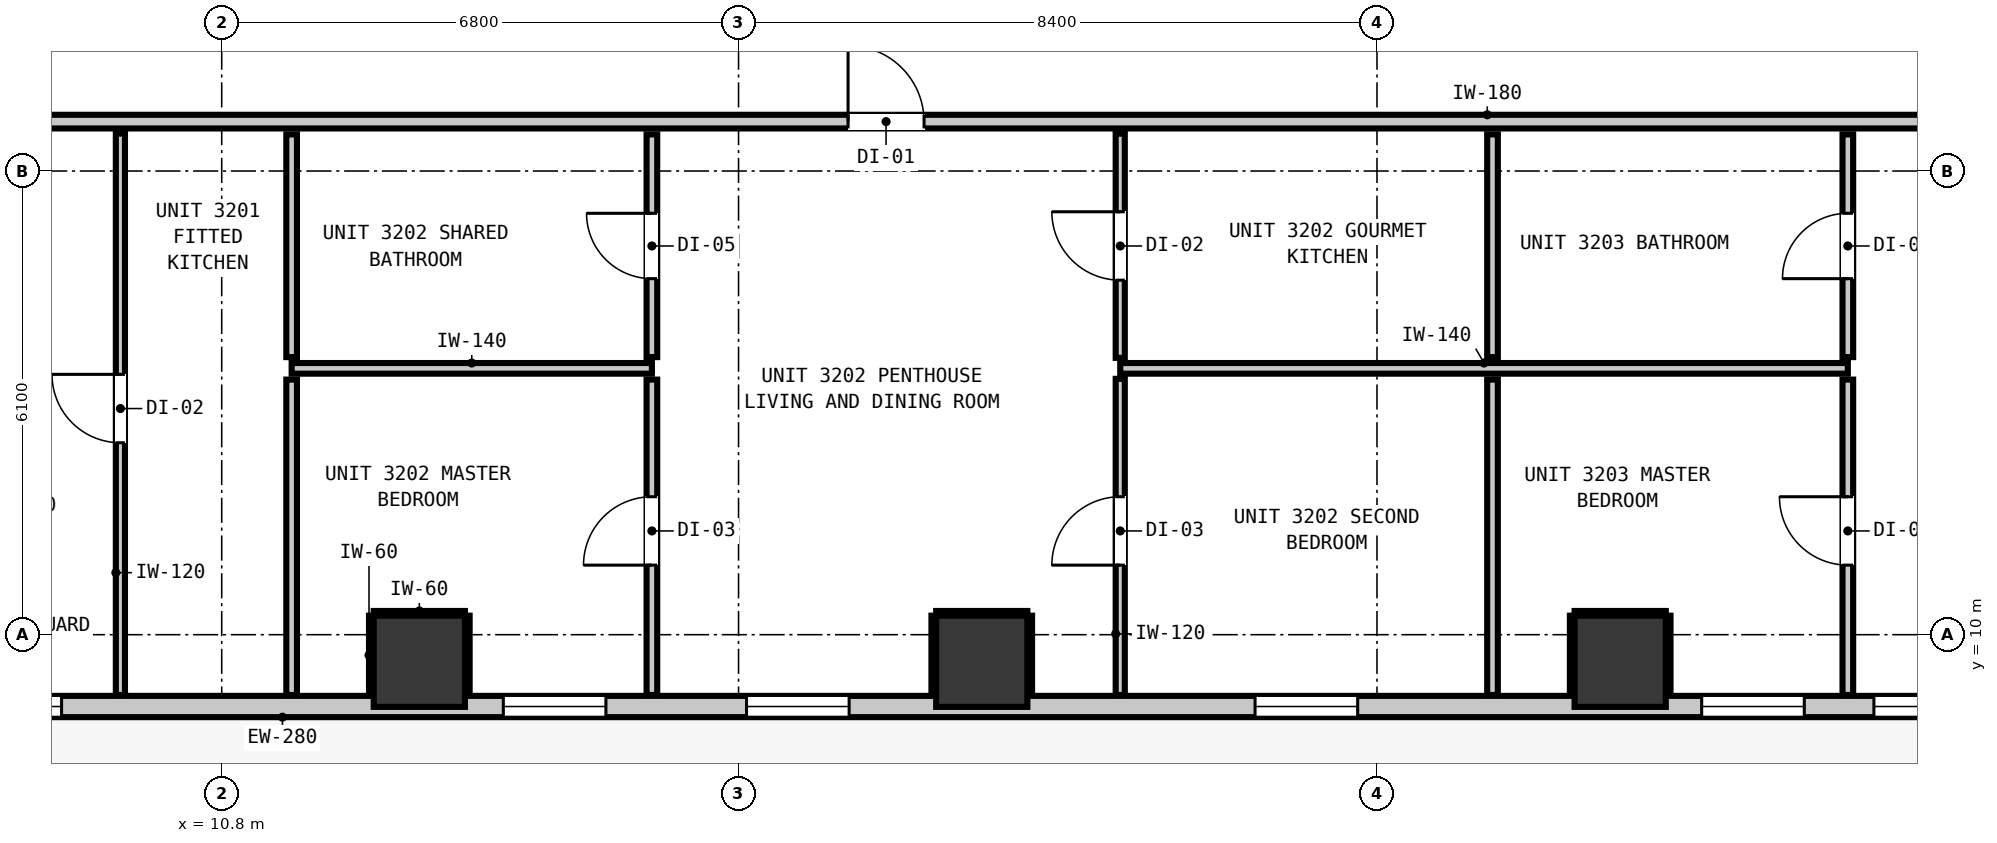
"""IFC4 building model, lengths in metres.
Left out: names, types, materials, properties, quantities, classifications, styles, units other than length and angle.
Written with IfcOpenShell. Run it as: python <this file> out.ifc"""

import sys

from ifc_helpers import new_model, si_unit, direction, frame, frame_2d, origin, origin_2d, place, context, subcontext, project, spatial, rectangle, extrude, element, fill, save


model = new_model("IFC4")
c1 = context("Model", 3, precision=1e-05, world=origin(), true_north=direction((0.0, 1.0)))
c2 = subcontext(c1, "Body", "Model", "MODEL_VIEW")
j1 = project(units=[si_unit("LENGTHUNIT", "METRE"), si_unit("PLANEANGLEUNIT", "RADIAN")], contexts=[c1])
p1 = place(None, origin())
s1 = spatial("IfcSite", under=j1, at=p1, CompositionType="ELEMENT")
p2 = place(p1, origin())
s2 = spatial("IfcBuilding", under=s1, at=p2, CompositionType="ELEMENT")
p3 = place(p2, frame((0.0, 0.0, 112.72)))
s3 = spatial("IfcBuildingStorey", under=s2, at=p3, CompositionType="ELEMENT", Elevation=112.72)
for number, where, z_axis, x_axis in (
    (1, (13.4, 9.65, 0.0), (0.0, 0.0, 1.0), (1.0, 0.0, 0.0)),
    (2, (20.8, 9.65, 0.0), (0.0, 0.0, 1.0), (1.0, 0.0, 0.0)),
    (3, (29.2, 9.65, 0.0), (0.0, 0.0, 1.0), (1.0, 0.0, 0.0)),
):
    element("IfcColumn", number, at=place(p3, frame(where, z_axis=z_axis, x_axis=x_axis)), inside=s3, PredefinedType="COLUMN", context=c2, shape_type="SweptSolid", body=[
        extrude(rectangle(XDim=1.2, YDim=1.2, at=origin_2d()), origin(), (0.0, 0.0, 1.0), 3.32),
    ])
p4 = place(p3, frame((40.445, 9.055, 0.0), z_axis=(0.0, 0.0, 1.0), x_axis=(-1.0, 0.0, 0.0)))
e4 = element("IfcWall", 4, at=p4, inside=s3, PredefinedType="STANDARD", context=c2, shape_type="SweptSolid", body=[
    extrude(rectangle(XDim=35.09, YDim=0.28, at=frame_2d((17.545, 0.0))), origin(), (0.0, 0.0, 1.0), 3.08),
])
p5 = place(p4, frame((5.114, 0.0, 0.0)))
e5 = element("IfcOpeningElement", 5, at=p5, cuts=e4, PredefinedType="OPENING", context=c2, shape_type="SweptSolid", body=[
    extrude(rectangle(XDim=1.0, YDim=2.15, at=frame_2d((0.5, 1.075))), frame((0.0, 0.15, 0.0), z_axis=(0.0, -1.0, 0.0), x_axis=(1.0, 0.0, 0.0)), (0.0, 0.0, 1.0), 0.3),
])
p6 = place(p4, frame((31.752, 0.0, 0.85)))
e6 = element("IfcOpeningElement", 6, at=p6, cuts=e4, PredefinedType="OPENING", context=c2, shape_type="SweptSolid", body=[
    extrude(rectangle(XDim=1.35, YDim=1.85, at=frame_2d((0.675, 0.925))), frame((0.0, 0.15, 0.0), z_axis=(0.0, -1.0, 0.0), x_axis=(1.0, 0.0, 0.0)), (0.0, 0.0, 1.0), 0.3),
])
p7 = place(p4, frame((34.198, 0.0, 0.85)))
e7 = element("IfcOpeningElement", 7, at=p7, cuts=e4, PredefinedType="OPENING", context=c2, shape_type="SweptSolid", body=[
    extrude(rectangle(XDim=0.58, YDim=1.5, at=frame_2d((0.29, 0.75))), frame((0.0, 0.15, 0.0), z_axis=(0.0, -1.0, 0.0), x_axis=(1.0, 0.0, 0.0)), (0.0, 0.0, 1.0), 0.3),
])
p8 = place(p4, frame((21.39, 0.0, 0.85)))
e8 = element("IfcOpeningElement", 8, at=p8, cuts=e4, PredefinedType="OPENING", context=c2, shape_type="SweptSolid", body=[
    extrude(rectangle(XDim=1.35, YDim=1.85, at=frame_2d((0.675, 0.925))), frame((0.0, 0.15, 0.0), z_axis=(0.0, -1.0, 0.0), x_axis=(1.0, 0.0, 0.0)), (0.0, 0.0, 1.0), 0.3),
])
p9 = place(p4, frame((24.59, 0.0, 0.85)))
e9 = element("IfcOpeningElement", 9, at=p9, cuts=e4, PredefinedType="OPENING", context=c2, shape_type="SweptSolid", body=[
    extrude(rectangle(XDim=1.35, YDim=1.85, at=frame_2d((0.675, 0.925))), frame((0.0, 0.15, 0.0), z_axis=(0.0, -1.0, 0.0), x_axis=(1.0, 0.0, 0.0)), (0.0, 0.0, 1.0), 0.3),
])
p10 = place(p4, frame((14.699, 0.0, 0.85)))
e10 = element("IfcOpeningElement", 10, at=p10, cuts=e4, PredefinedType="OPENING", context=c2, shape_type="SweptSolid", body=[
    extrude(rectangle(XDim=1.35, YDim=1.85, at=frame_2d((0.675, 0.925))), frame((0.0, 0.15, 0.0), z_axis=(0.0, -1.0, 0.0), x_axis=(1.0, 0.0, 0.0)), (0.0, 0.0, 1.0), 0.3),
])
p11 = place(p4, frame((6.557, 0.0, 0.85)))
e11 = element("IfcOpeningElement", 11, at=p11, cuts=e4, PredefinedType="OPENING", context=c2, shape_type="SweptSolid", body=[
    extrude(rectangle(XDim=1.35, YDim=1.85, at=frame_2d((0.675, 0.925))), frame((0.0, 0.15, 0.0), z_axis=(0.0, -1.0, 0.0), x_axis=(1.0, 0.0, 0.0)), (0.0, 0.0, 1.0), 0.3),
])
p12 = place(p4, frame((8.823, 0.0, 0.85)))
e12 = element("IfcOpeningElement", 12, at=p12, cuts=e4, PredefinedType="OPENING", context=c2, shape_type="SweptSolid", body=[
    extrude(rectangle(XDim=1.35, YDim=1.85, at=frame_2d((0.675, 0.925))), frame((0.0, 0.15, 0.0), z_axis=(0.0, -1.0, 0.0), x_axis=(1.0, 0.0, 0.0)), (0.0, 0.0, 1.0), 0.3),
])
p13 = place(p3, frame((3.207, 16.75, 0.0), z_axis=(0.0, 0.0, 1.0), x_axis=(1.0, 0.0, 0.0)))
e13 = element("IfcWall", 13, at=p13, inside=s3, PredefinedType="PARTITIONING", context=c2, shape_type="SweptSolid", body=[
    extrude(rectangle(XDim=39.386, YDim=0.18, at=frame_2d((19.693, 0.0))), origin(), (0.0, 0.0, 1.0), 3.08),
])
p14 = place(p13, frame((4.311, 0.0, 0.0)))
e14 = element("IfcOpeningElement", 14, at=p14, cuts=e13, PredefinedType="OPENING", context=c2, shape_type="SweptSolid", body=[
    extrude(rectangle(XDim=1.0, YDim=2.15, at=frame_2d((0.5, 1.075))), frame((0.0, 0.1, 0.0), z_axis=(0.0, -1.0, 0.0), x_axis=(1.0, 0.0, 0.0)), (0.0, 0.0, 1.0), 0.2),
])
p15 = place(p13, frame((15.834, 0.0, 0.0)))
e15 = element("IfcOpeningElement", 15, at=p15, cuts=e13, PredefinedType="OPENING", context=c2, shape_type="SweptSolid", body=[
    extrude(rectangle(XDim=1.0, YDim=2.15, at=frame_2d((0.5, 1.075))), frame((0.0, 0.1, 0.0), z_axis=(0.0, -1.0, 0.0), x_axis=(1.0, 0.0, 0.0)), (0.0, 0.0, 1.0), 0.2),
])
p16 = place(p13, frame((31.654, 0.0, 0.0)))
e16 = element("IfcOpeningElement", 16, at=p16, cuts=e13, PredefinedType="OPENING", context=c2, shape_type="SweptSolid", body=[
    extrude(rectangle(XDim=1.0, YDim=2.15, at=frame_2d((0.5, 1.075))), frame((0.0, 0.1, 0.0), z_axis=(0.0, -1.0, 0.0), x_axis=(1.0, 0.0, 0.0)), (0.0, 0.0, 1.0), 0.2),
])
p17 = place(p3, frame((11.72, 13.504, 0.0), z_axis=(0.0, 0.0, 1.0), x_axis=(1.0, 0.0, 0.0)))
e17 = element("IfcWall", 17, at=p17, inside=s3, PredefinedType="PARTITIONING", context=c2, shape_type="SweptSolid", body=[
    extrude(rectangle(XDim=4.74, YDim=0.14, at=frame_2d((2.37, 0.0))), origin(), (0.0, 0.0, 1.0), 3.08),
])
p18 = place(p3, frame((22.622, 13.504, 0.0), z_axis=(0.0, 0.0, 1.0), x_axis=(1.0, 0.0, 0.0)))
e18 = element("IfcWall", 18, at=p18, inside=s3, PredefinedType="PARTITIONING", context=c2, shape_type="SweptSolid", body=[
    extrude(rectangle(XDim=9.573, YDim=0.14, at=frame_2d((4.787, 0.0))), origin(), (0.0, 0.0, 1.0), 3.08),
])
p19 = place(p3, frame((11.72, 9.207, 0.0), z_axis=(0.0, 0.0, 1.0), x_axis=(0.0, 1.0, 0.0)))
e19 = element("IfcWall", 19, at=p19, inside=s3, PredefinedType="PARTITIONING", context=c2, shape_type="SweptSolid", body=[
    extrude(rectangle(XDim=4.149, YDim=0.14, at=frame_2d((2.074, 0.0))), origin(), (0.0, 0.0, 1.0), 3.08),
])
p20 = place(p3, frame((11.72, 13.652, 0.0), z_axis=(0.0, 0.0, 1.0), x_axis=(0.0, 1.0, 0.0)))
e20 = element("IfcWall", 20, at=p20, inside=s3, PredefinedType="PARTITIONING", context=c2, shape_type="SweptSolid", body=[
    extrude(rectangle(XDim=2.93, YDim=0.14, at=frame_2d((1.465, 0.0))), origin(), (0.0, 0.0, 1.0), 3.08),
])
p21 = place(p3, frame((16.46, 9.207, 0.0), z_axis=(0.0, 0.0, 1.0), x_axis=(0.0, 1.0, 0.0)))
e21 = element("IfcWall", 21, at=p21, inside=s3, PredefinedType="PARTITIONING", context=c2, shape_type="SweptSolid", body=[
    extrude(rectangle(XDim=4.149, YDim=0.14, at=frame_2d((2.074, 0.0))), origin(), (0.0, 0.0, 1.0), 3.08),
])
p22 = place(p21, frame((1.708, 0.0, 0.0)))
e22 = element("IfcOpeningElement", 22, at=p22, cuts=e21, PredefinedType="OPENING", context=c2, shape_type="SweptSolid", body=[
    extrude(rectangle(XDim=0.9, YDim=2.1, at=frame_2d((0.45, 1.05))), frame((0.0, 0.08, 0.0), z_axis=(0.0, -1.0, 0.0), x_axis=(1.0, 0.0, 0.0)), (0.0, 0.0, 1.0), 0.16),
])
p23 = place(p3, frame((16.46, 13.652, 0.0), z_axis=(0.0, 0.0, 1.0), x_axis=(0.0, 1.0, 0.0)))
e23 = element("IfcWall", 23, at=p23, inside=s3, PredefinedType="PARTITIONING", context=c2, shape_type="SweptSolid", body=[
    extrude(rectangle(XDim=2.93, YDim=0.14, at=frame_2d((1.465, 0.0))), origin(), (0.0, 0.0, 1.0), 3.08),
])
p24 = place(p23, frame((1.032, 0.0, 0.0)))
e24 = element("IfcOpeningElement", 24, at=p24, cuts=e23, PredefinedType="OPENING", context=c2, shape_type="SweptSolid", body=[
    extrude(rectangle(XDim=0.86, YDim=2.02, at=frame_2d((0.43, 1.01))), frame((0.0, 0.08, 0.0), z_axis=(0.0, -1.0, 0.0), x_axis=(1.0, 0.0, 0.0)), (0.0, 0.0, 1.0), 0.16),
])
p25 = place(p3, frame((27.52, 9.207, 0.0), z_axis=(0.0, 0.0, 1.0), x_axis=(0.0, 1.0, 0.0)))
e25 = element("IfcWall", 25, at=p25, inside=s3, PredefinedType="PARTITIONING", context=c2, shape_type="SweptSolid", body=[
    extrude(rectangle(XDim=4.149, YDim=0.14, at=frame_2d((2.074, 0.0))), origin(), (0.0, 0.0, 1.0), 3.08),
])
p26 = place(p3, frame((27.52, 13.652, 0.0), z_axis=(0.0, 0.0, 1.0), x_axis=(0.0, 1.0, 0.0)))
e26 = element("IfcWall", 26, at=p26, inside=s3, PredefinedType="PARTITIONING", context=c2, shape_type="SweptSolid", body=[
    extrude(rectangle(XDim=2.93, YDim=0.14, at=frame_2d((1.465, 0.0))), origin(), (0.0, 0.0, 1.0), 3.08),
])
p27 = place(p3, frame((32.195, 9.207, 0.0), z_axis=(0.0, 0.0, 1.0), x_axis=(0.0, 1.0, 0.0)))
e27 = element("IfcWall", 27, at=p27, inside=s3, PredefinedType="PARTITIONING", context=c2, shape_type="SweptSolid", body=[
    extrude(rectangle(XDim=4.149, YDim=0.14, at=frame_2d((2.074, 0.0))), origin(), (0.0, 0.0, 1.0), 3.08),
])
p28 = place(p27, frame((1.708, 0.0, 0.0)))
e28 = element("IfcOpeningElement", 28, at=p28, cuts=e27, PredefinedType="OPENING", context=c2, shape_type="SweptSolid", body=[
    extrude(rectangle(XDim=0.9, YDim=2.1, at=frame_2d((0.45, 1.05))), frame((0.0, 0.08, 0.0), z_axis=(0.0, -1.0, 0.0), x_axis=(1.0, 0.0, 0.0)), (0.0, 0.0, 1.0), 0.16),
])
p29 = place(p3, frame((32.195, 13.652, 0.0), z_axis=(0.0, 0.0, 1.0), x_axis=(0.0, 1.0, 0.0)))
e29 = element("IfcWall", 29, at=p29, inside=s3, PredefinedType="PARTITIONING", context=c2, shape_type="SweptSolid", body=[
    extrude(rectangle(XDim=2.93, YDim=0.14, at=frame_2d((1.465, 0.0))), origin(), (0.0, 0.0, 1.0), 3.08),
])
p30 = place(p29, frame((1.032, 0.0, 0.0)))
e30 = element("IfcOpeningElement", 30, at=p30, cuts=e29, PredefinedType="OPENING", context=c2, shape_type="SweptSolid", body=[
    extrude(rectangle(XDim=0.86, YDim=2.02, at=frame_2d((0.43, 1.01))), frame((0.0, 0.08, 0.0), z_axis=(0.0, -1.0, 0.0), x_axis=(1.0, 0.0, 0.0)), (0.0, 0.0, 1.0), 0.16),
])
p31 = place(p3, frame((9.467, 9.207, 0.0), z_axis=(0.0, 0.0, 1.0), x_axis=(0.0, 1.0, 0.0)))
e31 = element("IfcWall", 31, at=p31, inside=s3, PredefinedType="PARTITIONING", context=c2, shape_type="SweptSolid", body=[
    extrude(rectangle(XDim=7.385, YDim=0.12, at=frame_2d((3.692, 0.0))), origin(), (0.0, 0.0, 1.0), 3.08),
])
p32 = place(p31, frame((3.318, 0.0, 0.0)))
e32 = element("IfcOpeningElement", 32, at=p32, cuts=e31, PredefinedType="OPENING", context=c2, shape_type="SweptSolid", body=[
    extrude(rectangle(XDim=0.9, YDim=2.1, at=frame_2d((0.45, 1.05))), frame((0.0, 0.07, 0.0), z_axis=(0.0, -1.0, 0.0), x_axis=(1.0, 0.0, 0.0)), (0.0, 0.0, 1.0), 0.14),
])
p33 = place(p3, frame((22.622, 9.207, 0.0), z_axis=(0.0, 0.0, 1.0), x_axis=(0.0, 1.0, 0.0)))
e33 = element("IfcWall", 33, at=p33, inside=s3, PredefinedType="PARTITIONING", context=c2, shape_type="SweptSolid", body=[
    extrude(rectangle(XDim=4.159, YDim=0.12, at=frame_2d((2.08, 0.0))), origin(), (0.0, 0.0, 1.0), 3.08),
])
p34 = place(p33, frame((1.708, 0.0, 0.0)))
e34 = element("IfcOpeningElement", 34, at=p34, cuts=e33, PredefinedType="OPENING", context=c2, shape_type="SweptSolid", body=[
    extrude(rectangle(XDim=0.9, YDim=2.1, at=frame_2d((0.45, 1.05))), frame((0.0, 0.07, 0.0), z_axis=(0.0, -1.0, 0.0), x_axis=(1.0, 0.0, 0.0)), (0.0, 0.0, 1.0), 0.14),
])
p35 = place(p3, frame((22.622, 13.642, 0.0), z_axis=(0.0, 0.0, 1.0), x_axis=(0.0, 1.0, 0.0)))
e35 = element("IfcWall", 35, at=p35, inside=s3, PredefinedType="PARTITIONING", context=c2, shape_type="SweptSolid", body=[
    extrude(rectangle(XDim=2.95, YDim=0.12, at=frame_2d((1.475, 0.0))), origin(), (0.0, 0.0, 1.0), 3.08),
])
p36 = place(p35, frame((1.022, 0.0, 0.0)))
e36 = element("IfcOpeningElement", 36, at=p36, cuts=e35, PredefinedType="OPENING", context=c2, shape_type="SweptSolid", body=[
    extrude(rectangle(XDim=0.9, YDim=2.1, at=frame_2d((0.45, 1.05))), frame((0.0, 0.07, 0.0), z_axis=(0.0, -1.0, 0.0), x_axis=(1.0, 0.0, 0.0)), (0.0, 0.0, 1.0), 0.14),
])
p37 = place(p3, frame((12.8, 10.282, 0.0), z_axis=(0.0, 0.0, 1.0), x_axis=(1.0, 0.0, 0.0)))
e37 = element("IfcWall", 37, at=p37, inside=s3, PredefinedType="PARTITIONING", context=c2, shape_type="SweptSolid", body=[
    extrude(rectangle(XDim=1.2, YDim=0.06, at=frame_2d((0.6, 0.0))), origin(), (0.0, 0.0, 1.0), 1.45),
])
for number, where, z_axis, x_axis in (
    (38, (12.768, 9.21, 0.0), (0.0, 0.0, 1.0), (0.0, 1.0, 0.0)),
    (39, (14.032, 9.21, 0.0), (0.0, 0.0, 1.0), (0.0, 1.0, 0.0)),
):
    element("IfcWall", number, at=place(p3, frame(where, z_axis=z_axis, x_axis=x_axis)), inside=s3, PredefinedType="PARTITIONING", context=c2, shape_type="SweptSolid", body=[
        extrude(rectangle(XDim=1.04, YDim=0.06, at=frame_2d((0.52, 0.0))), origin(), (0.0, 0.0, 1.0), 1.45),
    ])
p38 = place(p3, frame((20.2, 10.282, 0.0), z_axis=(0.0, 0.0, 1.0), x_axis=(1.0, 0.0, 0.0)))
e40 = element("IfcWall", 40, at=p38, inside=s3, PredefinedType="PARTITIONING", context=c2, shape_type="SweptSolid", body=[
    extrude(rectangle(XDim=1.2, YDim=0.06, at=frame_2d((0.6, 0.0))), origin(), (0.0, 0.0, 1.0), 1.45),
])
for number, where, z_axis, x_axis in (
    (41, (20.168, 9.21, 0.0), (0.0, 0.0, 1.0), (0.0, 1.0, 0.0)),
    (42, (21.432, 9.21, 0.0), (0.0, 0.0, 1.0), (0.0, 1.0, 0.0)),
):
    element("IfcWall", number, at=place(p3, frame(where, z_axis=z_axis, x_axis=x_axis)), inside=s3, PredefinedType="PARTITIONING", context=c2, shape_type="SweptSolid", body=[
        extrude(rectangle(XDim=1.04, YDim=0.06, at=frame_2d((0.52, 0.0))), origin(), (0.0, 0.0, 1.0), 1.45),
    ])
p39 = place(p3, frame((28.6, 10.282, 0.0), z_axis=(0.0, 0.0, 1.0), x_axis=(1.0, 0.0, 0.0)))
e43 = element("IfcWall", 43, at=p39, inside=s3, PredefinedType="PARTITIONING", context=c2, shape_type="SweptSolid", body=[
    extrude(rectangle(XDim=1.2, YDim=0.06, at=frame_2d((0.6, 0.0))), origin(), (0.0, 0.0, 1.0), 1.45),
])
for number, where, z_axis, x_axis in (
    (44, (28.568, 9.21, 0.0), (0.0, 0.0, 1.0), (0.0, 1.0, 0.0)),
    (45, (29.832, 9.21, 0.0), (0.0, 0.0, 1.0), (0.0, 1.0, 0.0)),
):
    element("IfcWall", number, at=place(p3, frame(where, z_axis=z_axis, x_axis=x_axis)), inside=s3, PredefinedType="PARTITIONING", context=c2, shape_type="SweptSolid", body=[
        extrude(rectangle(XDim=1.04, YDim=0.06, at=frame_2d((0.52, 0.0))), origin(), (0.0, 0.0, 1.0), 1.45),
    ])
p40 = place(p6, origin())
e46 = element("IfcWindow", 46, at=p40, inside=s3, PartitioningType="SINGLE_PANEL", PredefinedType="WINDOW", context=c2, shape_type="SweptSolid", body=[
    extrude(rectangle(XDim=1.35, YDim=1.85, at=frame_2d((0.675, 0.925))), frame((0.0, 0.03, 0.0), z_axis=(0.0, -1.0, 0.0), x_axis=(1.0, 0.0, 0.0)), (0.0, 0.0, 1.0), 0.06),
])
fill(e6, e46)
p41 = place(p8, origin())
e47 = element("IfcWindow", 47, at=p41, inside=s3, PartitioningType="SINGLE_PANEL", PredefinedType="WINDOW", context=c2, shape_type="SweptSolid", body=[
    extrude(rectangle(XDim=1.35, YDim=1.85, at=frame_2d((0.675, 0.925))), frame((0.0, 0.03, 0.0), z_axis=(0.0, -1.0, 0.0), x_axis=(1.0, 0.0, 0.0)), (0.0, 0.0, 1.0), 0.06),
])
fill(e8, e47)
p42 = place(p9, origin())
e48 = element("IfcWindow", 48, at=p42, inside=s3, PartitioningType="SINGLE_PANEL", PredefinedType="WINDOW", context=c2, shape_type="SweptSolid", body=[
    extrude(rectangle(XDim=1.35, YDim=1.85, at=frame_2d((0.675, 0.925))), frame((0.0, 0.03, 0.0), z_axis=(0.0, -1.0, 0.0), x_axis=(1.0, 0.0, 0.0)), (0.0, 0.0, 1.0), 0.06),
])
fill(e9, e48)
p43 = place(p10, origin())
e49 = element("IfcWindow", 49, at=p43, inside=s3, PartitioningType="SINGLE_PANEL", PredefinedType="WINDOW", context=c2, shape_type="SweptSolid", body=[
    extrude(rectangle(XDim=1.35, YDim=1.85, at=frame_2d((0.675, 0.925))), frame((0.0, 0.03, 0.0), z_axis=(0.0, -1.0, 0.0), x_axis=(1.0, 0.0, 0.0)), (0.0, 0.0, 1.0), 0.06),
])
fill(e10, e49)
p44 = place(p11, origin())
e50 = element("IfcWindow", 50, at=p44, inside=s3, PartitioningType="SINGLE_PANEL", PredefinedType="WINDOW", context=c2, shape_type="SweptSolid", body=[
    extrude(rectangle(XDim=1.35, YDim=1.85, at=frame_2d((0.675, 0.925))), frame((0.0, 0.03, 0.0), z_axis=(0.0, -1.0, 0.0), x_axis=(1.0, 0.0, 0.0)), (0.0, 0.0, 1.0), 0.06),
])
fill(e11, e50)
p45 = place(p12, origin())
e51 = element("IfcWindow", 51, at=p45, inside=s3, PartitioningType="SINGLE_PANEL", PredefinedType="WINDOW", context=c2, shape_type="SweptSolid", body=[
    extrude(rectangle(XDim=1.35, YDim=1.85, at=frame_2d((0.675, 0.925))), frame((0.0, 0.03, 0.0), z_axis=(0.0, -1.0, 0.0), x_axis=(1.0, 0.0, 0.0)), (0.0, 0.0, 1.0), 0.06),
])
fill(e12, e51)
p46 = place(p32, origin())
e52 = element("IfcDoor", 52, at=p46, inside=s3, OperationType="SINGLE_SWING_RIGHT", PredefinedType="DOOR", context=c2, shape_type="SweptSolid", body=[
    extrude(rectangle(XDim=0.9, YDim=2.1, at=frame_2d((0.45, 1.05))), frame((0.0, 0.025, 0.0), z_axis=(0.0, -1.0, 0.0), x_axis=(1.0, 0.0, 0.0)), (0.0, 0.0, 1.0), 0.05),
])
fill(e32, e52)
p47 = place(p15, origin())
e53 = element("IfcDoor", 53, at=p47, inside=s3, OperationType="SINGLE_SWING_LEFT", PredefinedType="DOOR", context=c2, shape_type="SweptSolid", body=[
    extrude(rectangle(XDim=1.0, YDim=2.15, at=frame_2d((0.5, 1.075))), frame((0.0, 0.025, 0.0), z_axis=(0.0, -1.0, 0.0), x_axis=(1.0, 0.0, 0.0)), (0.0, 0.0, 1.0), 0.05),
])
fill(e15, e53)
p48 = place(p24, origin())
e54 = element("IfcDoor", 54, at=p48, inside=s3, OperationType="SINGLE_SWING_RIGHT", PredefinedType="DOOR", context=c2, shape_type="SweptSolid", body=[
    extrude(rectangle(XDim=0.86, YDim=2.02, at=frame_2d((0.43, 1.01))), frame((0.0, 0.025, 0.0), z_axis=(0.0, -1.0, 0.0), x_axis=(1.0, 0.0, 0.0)), (0.0, 0.0, 1.0), 0.05),
])
fill(e24, e54)
p49 = place(p22, origin())
e55 = element("IfcDoor", 55, at=p49, inside=s3, OperationType="SINGLE_SWING_LEFT", PredefinedType="DOOR", context=c2, shape_type="SweptSolid", body=[
    extrude(rectangle(XDim=0.9, YDim=2.1, at=frame_2d((0.45, 1.05))), frame((0.0, 0.025, 0.0), z_axis=(0.0, -1.0, 0.0), x_axis=(1.0, 0.0, 0.0)), (0.0, 0.0, 1.0), 0.05),
])
fill(e22, e55)
p50 = place(p36, origin())
e56 = element("IfcDoor", 56, at=p50, inside=s3, OperationType="SINGLE_SWING_RIGHT", PredefinedType="DOOR", context=c2, shape_type="SweptSolid", body=[
    extrude(rectangle(XDim=0.9, YDim=2.1, at=frame_2d((0.45, 1.05))), frame((0.0, 0.025, 0.0), z_axis=(0.0, -1.0, 0.0), x_axis=(1.0, 0.0, 0.0)), (0.0, 0.0, 1.0), 0.05),
])
fill(e36, e56)
p51 = place(p34, origin())
e57 = element("IfcDoor", 57, at=p51, inside=s3, OperationType="SINGLE_SWING_LEFT", PredefinedType="DOOR", context=c2, shape_type="SweptSolid", body=[
    extrude(rectangle(XDim=0.9, YDim=2.1, at=frame_2d((0.45, 1.05))), frame((0.0, 0.025, 0.0), z_axis=(0.0, -1.0, 0.0), x_axis=(1.0, 0.0, 0.0)), (0.0, 0.0, 1.0), 0.05),
])
fill(e34, e57)
p52 = place(p30, origin())
e58 = element("IfcDoor", 58, at=p52, inside=s3, OperationType="SINGLE_SWING_LEFT", PredefinedType="DOOR", context=c2, shape_type="SweptSolid", body=[
    extrude(rectangle(XDim=0.86, YDim=2.02, at=frame_2d((0.43, 1.01))), frame((0.0, 0.025, 0.0), z_axis=(0.0, -1.0, 0.0), x_axis=(1.0, 0.0, 0.0)), (0.0, 0.0, 1.0), 0.05),
])
fill(e30, e58)
p53 = place(p28, origin())
e59 = element("IfcDoor", 59, at=p53, inside=s3, OperationType="SINGLE_SWING_RIGHT", PredefinedType="DOOR", context=c2, shape_type="SweptSolid", body=[
    extrude(rectangle(XDim=0.9, YDim=2.1, at=frame_2d((0.45, 1.05))), frame((0.0, 0.025, 0.0), z_axis=(0.0, -1.0, 0.0), x_axis=(1.0, 0.0, 0.0)), (0.0, 0.0, 1.0), 0.05),
])
fill(e28, e59)
save(model, sys.argv[1])
